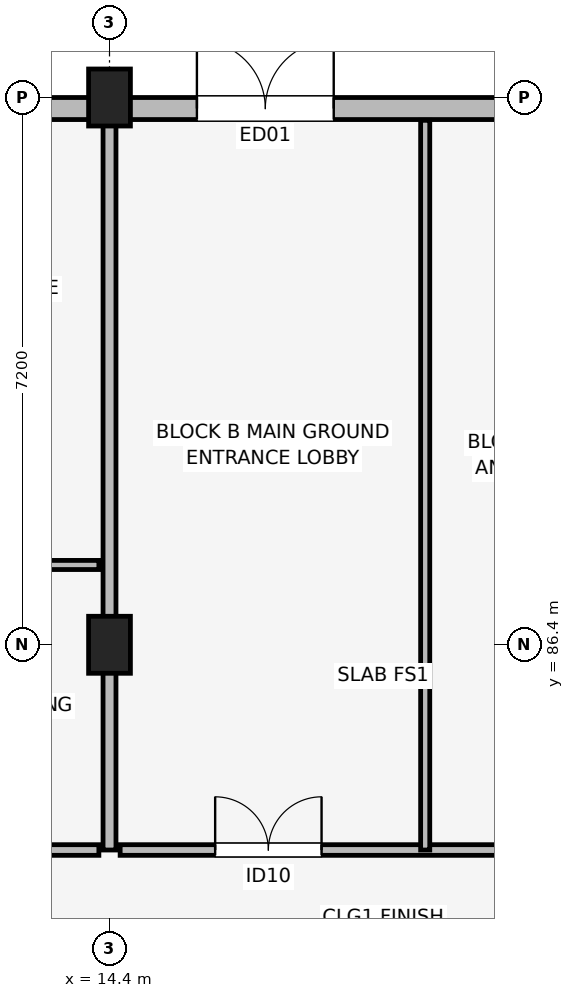
"""IFC4 building model, lengths in metres.
Left out: names, types, materials, properties, quantities, classifications, styles, units other than length and angle.
Written with IfcOpenShell. Run it as: python <this file> out.ifc"""

import sys

from ifc_helpers import new_model, si_unit, direction, frame, frame_2d, origin, origin_2d, place, context, subcontext, project, spatial, rectangle, extrude, element, fill, save


model = new_model("IFC4")
c1 = context("Model", 3, precision=1e-05, world=origin(), true_north=direction((0.0, 1.0)))
c2 = subcontext(c1, "Body", "Model", "MODEL_VIEW")
j1 = project(units=[si_unit("LENGTHUNIT", "METRE"), si_unit("PLANEANGLEUNIT", "RADIAN")], contexts=[c1])
p1 = place(None, origin())
s1 = spatial("IfcSite", under=j1, at=p1, CompositionType="ELEMENT")
p2 = place(p1, origin())
s2 = spatial("IfcBuilding", under=s1, at=p2, CompositionType="ELEMENT")
p3 = place(p2, origin())
s3 = spatial("IfcBuildingStorey", under=s2, at=p3, CompositionType="ELEMENT", Elevation=0.0)
for number, where, z_axis, x_axis in (
    (1, (14.4, 86.4, 0.0), (0.0, 0.0, 1.0), (1.0, 0.0, 0.0)),
    (2, (14.4, 93.6, 0.0), (0.0, 0.0, 1.0), (1.0, 0.0, 0.0)),
):
    element("IfcColumn", number, at=place(p3, frame(where, z_axis=z_axis, x_axis=x_axis)), inside=s3, PredefinedType="COLUMN", context=c2, shape_type="SweptSolid", body=[
        extrude(rectangle(XDim=0.55, YDim=0.75, at=origin_2d()), origin(), (0.0, 0.0, 1.0), 4.5),
    ])
p4 = place(p3, frame((32.8, 93.455, 0.0), z_axis=(0.0, 0.0, 1.0), x_axis=(-1.0, 0.0, 0.0)))
e3 = element("IfcWall", 3, at=p4, inside=s3, PredefinedType="SOLIDWALL", context=c2, shape_type="SweptSolid", body=[
    extrude(rectangle(XDim=29.6, YDim=0.29, at=frame_2d((14.8, 0.0))), origin(), (0.0, 0.0, 1.0), 3.48),
])
p5 = place(p4, frame((17.25, 0.0, 0.0), z_axis=(0.0, 0.0, 1.0), x_axis=(-1.0, 0.0, 0.0)))
e4 = element("IfcOpeningElement", 4, at=p5, cuts=e3, PredefinedType="OPENING", context=c2, shape_type="SweptSolid", body=[
    extrude(rectangle(XDim=1.8, YDim=2.4, at=frame_2d((0.9, 1.2))), frame((0.0, 0.155, 0.0), z_axis=(0.0, -1.0, 0.0), x_axis=(1.0, 0.0, 0.0)), (0.0, 0.0, 1.0), 0.31),
])
p6 = place(p4, frame((26.157, 0.0, 0.75)))
e5 = element("IfcOpeningElement", 5, at=p6, cuts=e3, PredefinedType="OPENING", context=c2, shape_type="SweptSolid", body=[
    extrude(rectangle(XDim=0.98, YDim=1.45, at=frame_2d((0.49, 0.725))), frame((0.0, 0.155, 0.0), z_axis=(0.0, -1.0, 0.0), x_axis=(1.0, 0.0, 0.0)), (0.0, 0.0, 1.0), 0.31),
])
p7 = place(p4, frame((23.778, 0.0, 0.75)))
e6 = element("IfcOpeningElement", 6, at=p7, cuts=e3, PredefinedType="OPENING", context=c2, shape_type="SweptSolid", body=[
    extrude(rectangle(XDim=1.1, YDim=1.5, at=frame_2d((0.55, 0.75))), frame((0.0, 0.155, 0.0), z_axis=(0.0, -1.0, 0.0), x_axis=(1.0, 0.0, 0.0)), (0.0, 0.0, 1.0), 0.31),
])
p8 = place(p4, frame((19.883, 0.0, 0.7)))
e7 = element("IfcOpeningElement", 7, at=p8, cuts=e3, PredefinedType="OPENING", context=c2, shape_type="SweptSolid", body=[
    extrude(rectangle(XDim=2.3, YDim=1.65, at=frame_2d((1.15, 0.825))), frame((0.0, 0.155, 0.0), z_axis=(0.0, -1.0, 0.0), x_axis=(1.0, 0.0, 0.0)), (0.0, 0.0, 1.0), 0.31),
])
p9 = place(p4, frame((6.375, 0.0, 0.7)))
e8 = element("IfcOpeningElement", 8, at=p9, cuts=e3, PredefinedType="OPENING", context=c2, shape_type="SweptSolid", body=[
    extrude(rectangle(XDim=2.45, YDim=1.65, at=frame_2d((1.225, 0.825))), frame((0.0, 0.155, 0.0), z_axis=(0.0, -1.0, 0.0), x_axis=(1.0, 0.0, 0.0)), (0.0, 0.0, 1.0), 0.31),
])
p10 = place(p4, frame((2.093, 0.0, 0.75)))
e9 = element("IfcOpeningElement", 9, at=p10, cuts=e3, PredefinedType="OPENING", context=c2, shape_type="SweptSolid", body=[
    extrude(rectangle(XDim=1.46, YDim=1.55, at=frame_2d((0.73, 0.775))), frame((0.0, 0.155, 0.0), z_axis=(0.0, -1.0, 0.0), x_axis=(1.0, 0.0, 0.0)), (0.0, 0.0, 1.0), 0.31),
])
p11 = place(p4, frame((0.755, 0.0, 0.75)))
e10 = element("IfcOpeningElement", 10, at=p11, cuts=e3, PredefinedType="OPENING", context=c2, shape_type="SweptSolid", body=[
    extrude(rectangle(XDim=0.6, YDim=1.25, at=frame_2d((0.3, 0.625))), frame((0.0, 0.155, 0.0), z_axis=(0.0, -1.0, 0.0), x_axis=(1.0, 0.0, 0.0)), (0.0, 0.0, 1.0), 0.31),
])
p12 = place(p3, frame((7.34, 83.7, 0.0), z_axis=(0.0, 0.0, 1.0), x_axis=(1.0, 0.0, 0.0)))
e11 = element("IfcWall", 11, at=p12, inside=s3, PredefinedType="PARTITIONING", context=c2, shape_type="SweptSolid", body=[
    extrude(rectangle(XDim=6.92, YDim=0.14, at=frame_2d((3.46, 0.0))), origin(), (0.0, 0.0, 1.0), 3.15),
])
p13 = place(p12, frame((4.995, 0.0, 0.0)))
e12 = element("IfcOpeningElement", 12, at=p13, cuts=e11, PredefinedType="OPENING", context=c2, shape_type="SweptSolid", body=[
    extrude(rectangle(XDim=0.98, YDim=2.1, at=frame_2d((0.49, 1.05))), frame((0.0, 0.08, 0.0), z_axis=(0.0, -1.0, 0.0), x_axis=(1.0, 0.0, 0.0)), (0.0, 0.0, 1.0), 0.16),
])
p14 = place(p3, frame((7.34, 87.45, 0.0), z_axis=(0.0, 0.0, 1.0), x_axis=(1.0, 0.0, 0.0)))
e13 = element("IfcWall", 13, at=p14, inside=s3, PredefinedType="PARTITIONING", context=c2, shape_type="SweptSolid", body=[
    extrude(rectangle(XDim=6.92, YDim=0.12, at=frame_2d((3.46, 0.0))), origin(), (0.0, 0.0, 1.0), 3.15),
])
p15 = place(p14, frame((1.475, 0.0, 0.0), z_axis=(0.0, 0.0, 1.0), x_axis=(-1.0, 0.0, 0.0)))
e14 = element("IfcOpeningElement", 14, at=p15, cuts=e13, PredefinedType="OPENING", context=c2, shape_type="SweptSolid", body=[
    extrude(rectangle(XDim=0.85, YDim=2.08, at=frame_2d((0.425, 1.04))), frame((0.0, 0.07, 0.0), z_axis=(0.0, -1.0, 0.0), x_axis=(1.0, 0.0, 0.0)), (0.0, 0.0, 1.0), 0.14),
])
p16 = place(p14, frame((2.625, 0.0, 0.0)))
e15 = element("IfcOpeningElement", 15, at=p16, cuts=e13, PredefinedType="OPENING", context=c2, shape_type="SweptSolid", body=[
    extrude(rectangle(XDim=0.9, YDim=2.08, at=frame_2d((0.45, 1.04))), frame((0.0, 0.07, 0.0), z_axis=(0.0, -1.0, 0.0), x_axis=(1.0, 0.0, 0.0)), (0.0, 0.0, 1.0), 0.14),
])
p17 = place(p14, frame((5.96, 0.0, 0.0), z_axis=(0.0, 0.0, 1.0), x_axis=(-1.0, 0.0, 0.0)))
e16 = element("IfcOpeningElement", 16, at=p17, cuts=e13, PredefinedType="OPENING", context=c2, shape_type="SweptSolid", body=[
    extrude(rectangle(XDim=0.95, YDim=2.08, at=frame_2d((0.475, 1.04))), frame((0.0, 0.07, 0.0), z_axis=(0.0, -1.0, 0.0), x_axis=(1.0, 0.0, 0.0)), (0.0, 0.0, 1.0), 0.14),
])
p18 = place(p3, frame((14.4, 83.7, 0.0), z_axis=(0.0, 0.0, 1.0), x_axis=(0.0, 1.0, 0.0)))
e17 = element("IfcWall", 17, at=p18, inside=s3, PredefinedType="PARTITIONING", context=c2, shape_type="SweptSolid", body=[
    extrude(rectangle(XDim=9.6, YDim=0.17, at=frame_2d((4.8, 0.0))), origin(), (0.0, 0.0, 1.0), 3.15),
])
p19 = place(p3, frame((14.54, 83.7, 0.0), z_axis=(0.0, 0.0, 1.0), x_axis=(1.0, 0.0, 0.0)))
e18 = element("IfcWall", 18, at=p19, inside=s3, PredefinedType="PARTITIONING", context=c2, shape_type="SweptSolid", body=[
    extrude(rectangle(XDim=6.92, YDim=0.14, at=frame_2d((3.46, 0.0))), origin(), (0.0, 0.0, 1.0), 3.15),
])
p20 = place(p19, frame((1.25, 0.0, 0.0)))
e19 = element("IfcOpeningElement", 19, at=p20, cuts=e18, PredefinedType="OPENING", context=c2, shape_type="SweptSolid", body=[
    extrude(rectangle(XDim=1.4, YDim=2.22, at=frame_2d((0.7, 1.11))), frame((0.0, 0.08, 0.0), z_axis=(0.0, -1.0, 0.0), x_axis=(1.0, 0.0, 0.0)), (0.0, 0.0, 1.0), 0.16),
])
p21 = place(p19, frame((6.07, 0.0, 0.0), z_axis=(0.0, 0.0, 1.0), x_axis=(-1.0, 0.0, 0.0)))
e20 = element("IfcOpeningElement", 20, at=p21, cuts=e18, PredefinedType="OPENING", context=c2, shape_type="SweptSolid", body=[
    extrude(rectangle(XDim=1.0, YDim=2.12, at=frame_2d((0.5, 1.06))), frame((0.0, 0.08, 0.0), z_axis=(0.0, -1.0, 0.0), x_axis=(1.0, 0.0, 0.0)), (0.0, 0.0, 1.0), 0.16),
])
p22 = place(p3, frame((18.554, 83.7, 0.0), z_axis=(0.0, 0.0, 1.0), x_axis=(0.0, 1.0, 0.0)))
e21 = element("IfcWall", 21, at=p22, inside=s3, PredefinedType="PARTITIONING", context=c2, shape_type="SweptSolid", body=[
    extrude(rectangle(XDim=9.6, YDim=0.12, at=frame_2d((4.8, 0.0))), origin(), (0.0, 0.0, 1.0), 3.15),
])
p23 = place(p5, origin())
e22 = element("IfcDoor", 22, at=p23, inside=s3, OperationType="DOUBLE_DOOR_SINGLE_SWING", PredefinedType="DOOR", context=c2, shape_type="SweptSolid", body=[
    extrude(rectangle(XDim=1.8, YDim=2.4, at=frame_2d((0.9, 1.2))), frame((0.0, 0.025, 0.0), z_axis=(0.0, -1.0, 0.0), x_axis=(1.0, 0.0, 0.0)), (0.0, 0.0, 1.0), 0.05),
])
fill(e4, e22)
p24 = place(p20, origin())
e23 = element("IfcDoor", 23, at=p24, inside=s3, OperationType="DOUBLE_DOOR_SINGLE_SWING", PredefinedType="DOOR", context=c2, shape_type="SweptSolid", body=[
    extrude(rectangle(XDim=1.4, YDim=2.22, at=frame_2d((0.7, 1.11))), frame((0.0, 0.025, 0.0), z_axis=(0.0, -1.0, 0.0), x_axis=(1.0, 0.0, 0.0)), (0.0, 0.0, 1.0), 0.05),
])
fill(e19, e23)
save(model, sys.argv[1])
